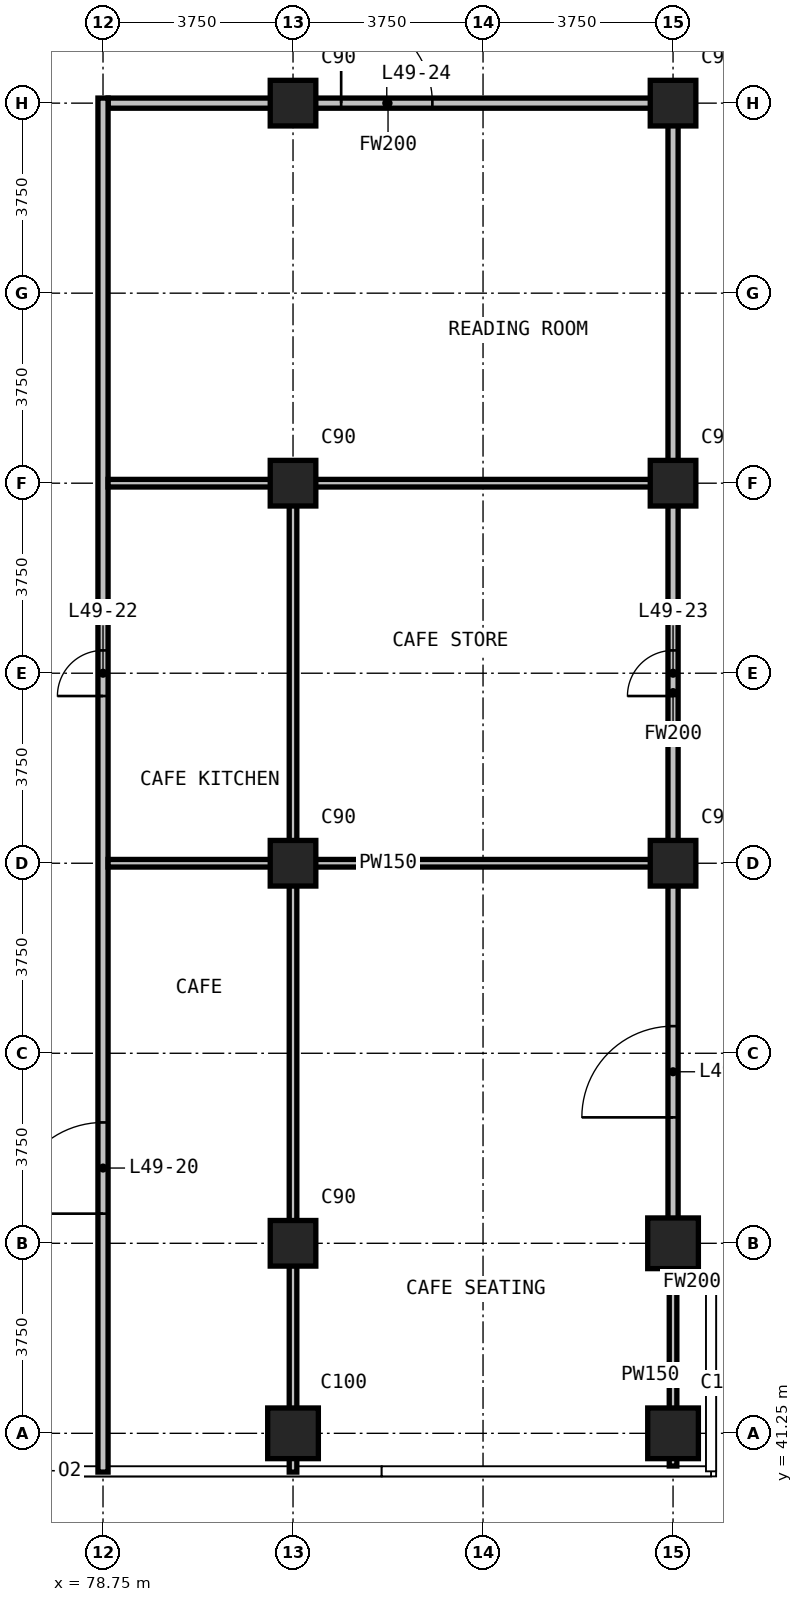
"""IFC4 building model, lengths in metres.
Left out: names, types, materials, properties, quantities, classifications, styles, units other than length and angle.
Written with IfcOpenShell. Run it as: python <this file> out.ifc"""

import sys

from ifc_helpers import new_model, si_unit, direction, frame, frame_2d, origin, origin_2d, place, context, subcontext, project, spatial, rectangle, extrude, element, fill, save


model = new_model("IFC4")
c1 = context("Model", 3, precision=1e-05, world=origin(), true_north=direction((0.0, 1.0)))
c2 = subcontext(c1, "Body", "Model", "MODEL_VIEW")
j1 = project(units=[si_unit("LENGTHUNIT", "METRE"), si_unit("PLANEANGLEUNIT", "RADIAN")], contexts=[c1])
p1 = place(None, origin())
s1 = spatial("IfcSite", under=j1, at=p1, CompositionType="ELEMENT")
p2 = place(p1, origin())
s2 = spatial("IfcBuilding", under=s1, at=p2, CompositionType="ELEMENT")
p3 = place(p2, frame((0.0, 0.0, 192.3)))
s3 = spatial("IfcBuildingStorey", under=s2, at=p3, CompositionType="ELEMENT", Elevation=192.3)
p4 = place(p3, frame((82.5, 41.25, 0.0), z_axis=(0.0, 0.0, 1.0), x_axis=(1.0, 0.0, 0.0)))
e1 = element("IfcColumn", 1, at=p4, inside=s3, PredefinedType="COLUMN", context=c2, shape_type="SweptSolid", body=[
    extrude(rectangle(XDim=1.0, YDim=1.0, at=origin_2d()), origin(), (0.0, 0.0, 1.0), 3.6),
])
for number, where, z_axis, x_axis in (
    (2, (82.5, 45.0, 0.0), (0.0, 0.0, 1.0), (1.0, 0.0, 0.0)),
    (3, (82.5, 52.5, 0.0), (0.0, 0.0, 1.0), (1.0, 0.0, 0.0)),
    (4, (82.5, 60.0, 0.0), (0.0, 0.0, 1.0), (1.0, 0.0, 0.0)),
    (5, (82.5, 67.5, 0.0), (0.0, 0.0, 1.0), (1.0, 0.0, 0.0)),
):
    element("IfcColumn", number, at=place(p3, frame(where, z_axis=z_axis, x_axis=x_axis)), inside=s3, PredefinedType="COLUMN", context=c2, shape_type="SweptSolid", body=[
        extrude(rectangle(XDim=0.9, YDim=0.9, at=origin_2d()), origin(), (0.0, 0.0, 1.0), 3.6),
    ])
for number, where, z_axis, x_axis in (
    (6, (90.0, 41.25, 0.0), (0.0, 0.0, 1.0), (1.0, 0.0, 0.0)),
    (7, (90.0, 45.0, 0.0), (0.0, 0.0, 1.0), (1.0, 0.0, 0.0)),
):
    element("IfcColumn", number, at=place(p3, frame(where, z_axis=z_axis, x_axis=x_axis)), inside=s3, PredefinedType="COLUMN", context=c2, shape_type="SweptSolid", body=[
        extrude(rectangle(XDim=1.0, YDim=1.0, at=origin_2d()), origin(), (0.0, 0.0, 1.0), 3.6),
    ])
for number, where, z_axis, x_axis in (
    (8, (90.0, 52.5, 0.0), (0.0, 0.0, 1.0), (1.0, 0.0, 0.0)),
    (9, (90.0, 60.0, 0.0), (0.0, 0.0, 1.0), (1.0, 0.0, 0.0)),
    (10, (90.0, 67.5, 0.0), (0.0, 0.0, 1.0), (1.0, 0.0, 0.0)),
):
    element("IfcColumn", number, at=place(p3, frame(where, z_axis=z_axis, x_axis=x_axis)), inside=s3, PredefinedType="COLUMN", context=c2, shape_type="SweptSolid", body=[
        extrude(rectangle(XDim=0.9, YDim=0.9, at=origin_2d()), origin(), (0.0, 0.0, 1.0), 3.6),
    ])
p5 = place(p3, frame((90.1, 44.235, 0.0), z_axis=(0.0, 0.0, 1.0), x_axis=(1.0, 0.0, 0.0)))
e11 = element("IfcWall", 11, at=p5, inside=s3, PredefinedType="PARTITIONING", context=c2, shape_type="SweptSolid", body=[
    extrude(rectangle(XDim=0.545, YDim=0.2, at=frame_2d((0.272, 0.0))), origin(), (0.0, 0.0, 1.0), 3.3),
])
p6 = place(p3, frame((78.85, 67.5, 0.0), z_axis=(0.0, 0.0, 1.0), x_axis=(1.0, 0.0, 0.0)))
e12 = element("IfcWall", 12, at=p6, inside=s3, PredefinedType="PARTITIONING", context=c2, shape_type="SweptSolid", body=[
    extrude(rectangle(XDim=11.05, YDim=0.2, at=frame_2d((5.525, 0.0))), origin(), (0.0, 0.0, 1.0), 3.3),
])
p7 = place(p6, frame((4.6, 0.0, 0.0)))
e13 = element("IfcOpeningElement", 13, at=p7, cuts=e12, PredefinedType="OPENING", context=c2, shape_type="SweptSolid", body=[
    extrude(rectangle(XDim=1.8, YDim=2.2, at=frame_2d((0.9, 1.1))), frame((0.0, 0.11, 0.0), z_axis=(0.0, -1.0, 0.0), x_axis=(1.0, 0.0, 0.0)), (0.0, 0.0, 1.0), 0.22),
])
p8 = place(p3, frame((78.75, 40.485, 0.0), z_axis=(0.0, 0.0, 1.0), x_axis=(0.0, 1.0, 0.0)))
e14 = element("IfcWall", 14, at=p8, inside=s3, PredefinedType="PARTITIONING", context=c2, shape_type="SweptSolid", body=[
    extrude(rectangle(XDim=27.115, YDim=0.2, at=frame_2d((13.558, 0.0))), origin(), (0.0, 0.0, 1.0), 3.3),
])
p9 = place(p8, frame((5.1, 0.0, 0.0)))
e15 = element("IfcOpeningElement", 15, at=p9, cuts=e14, PredefinedType="OPENING", context=c2, shape_type="SweptSolid", body=[
    extrude(rectangle(XDim=1.8, YDim=2.2, at=frame_2d((0.9, 1.1))), frame((0.0, 0.11, 0.0), z_axis=(0.0, -1.0, 0.0), x_axis=(1.0, 0.0, 0.0)), (0.0, 0.0, 1.0), 0.22),
])
p10 = place(p8, frame((15.315, 0.0, 0.0)))
e16 = element("IfcOpeningElement", 16, at=p10, cuts=e14, PredefinedType="OPENING", context=c2, shape_type="SweptSolid", body=[
    extrude(rectangle(XDim=0.9, YDim=2.2, at=frame_2d((0.45, 1.1))), frame((0.0, 0.11, 0.0), z_axis=(0.0, -1.0, 0.0), x_axis=(1.0, 0.0, 0.0)), (0.0, 0.0, 1.0), 0.22),
])
p11 = place(p3, frame((90.0, 44.135, 0.0), z_axis=(0.0, 0.0, 1.0), x_axis=(0.0, 1.0, 0.0)))
e17 = element("IfcWall", 17, at=p11, inside=s3, PredefinedType="PARTITIONING", context=c2, shape_type="SweptSolid", body=[
    extrude(rectangle(XDim=23.465, YDim=0.2, at=frame_2d((11.732, 0.0))), origin(), (0.0, 0.0, 1.0), 3.3),
])
p12 = place(p11, frame((3.35, 0.0, 0.0)))
e18 = element("IfcOpeningElement", 18, at=p12, cuts=e17, PredefinedType="OPENING", context=c2, shape_type="SweptSolid", body=[
    extrude(rectangle(XDim=1.8, YDim=2.2, at=frame_2d((0.9, 1.1))), frame((0.0, 0.11, 0.0), z_axis=(0.0, -1.0, 0.0), x_axis=(1.0, 0.0, 0.0)), (0.0, 0.0, 1.0), 0.22),
])
p13 = place(p11, frame((11.665, 0.0, 0.0)))
e19 = element("IfcOpeningElement", 19, at=p13, cuts=e17, PredefinedType="OPENING", context=c2, shape_type="SweptSolid", body=[
    extrude(rectangle(XDim=0.9, YDim=2.2, at=frame_2d((0.45, 1.1))), frame((0.0, 0.11, 0.0), z_axis=(0.0, -1.0, 0.0), x_axis=(1.0, 0.0, 0.0)), (0.0, 0.0, 1.0), 0.22),
])
for number, where, z_axis, x_axis in (
    (20, (78.85, 52.5, 0.0), (0.0, 0.0, 1.0), (1.0, 0.0, 0.0)),
    (21, (78.85, 60.0, 0.0), (0.0, 0.0, 1.0), (1.0, 0.0, 0.0)),
):
    element("IfcWall", number, at=place(p3, frame(where, z_axis=z_axis, x_axis=x_axis)), inside=s3, PredefinedType="PARTITIONING", context=c2, shape_type="SweptSolid", body=[
        extrude(rectangle(XDim=11.05, YDim=0.15, at=frame_2d((5.525, 0.0))), origin(), (0.0, 0.0, 1.0), 3.3),
    ])
p14 = place(p3, frame((82.5, 40.485, 0.0), z_axis=(0.0, 0.0, 1.0), x_axis=(0.0, 1.0, 0.0)))
e22 = element("IfcWall", 22, at=p14, inside=s3, PredefinedType="PARTITIONING", context=c2, shape_type="SweptSolid", body=[
    extrude(rectangle(XDim=19.44, YDim=0.15, at=frame_2d((9.72, 0.0))), origin(), (0.0, 0.0, 1.0), 3.3),
])
p15 = place(p3, frame((90.0, 40.605, 0.0), z_axis=(0.0, 0.0, 1.0), x_axis=(0.0, 1.0, 0.0)))
e23 = element("IfcWall", 23, at=p15, inside=s3, PredefinedType="PARTITIONING", context=c2, shape_type="SweptSolid", body=[
    extrude(rectangle(XDim=3.6, YDim=0.15, at=frame_2d((1.8, 0.0))), origin(), (0.0, 0.0, 1.0), 3.3),
])
p16 = place(p9, origin())
e24 = element("IfcDoor", 24, at=p16, inside=s3, OperationType="DOUBLE_DOOR_SINGLE_SWING", PredefinedType="DOOR", context=c2, shape_type="SweptSolid", body=[
    extrude(rectangle(XDim=1.8, YDim=2.2, at=frame_2d((0.9, 1.1))), frame((0.0, 0.025, 0.0), z_axis=(0.0, -1.0, 0.0), x_axis=(1.0, 0.0, 0.0)), (0.0, 0.0, 1.0), 0.05),
])
fill(e15, e24)
p17 = place(p12, origin())
e25 = element("IfcDoor", 25, at=p17, inside=s3, OperationType="DOUBLE_DOOR_SINGLE_SWING", PredefinedType="DOOR", context=c2, shape_type="SweptSolid", body=[
    extrude(rectangle(XDim=1.8, YDim=2.2, at=frame_2d((0.9, 1.1))), frame((0.0, 0.025, 0.0), z_axis=(0.0, -1.0, 0.0), x_axis=(1.0, 0.0, 0.0)), (0.0, 0.0, 1.0), 0.05),
])
fill(e18, e25)
p18 = place(p10, origin())
e26 = element("IfcDoor", 26, at=p18, inside=s3, OperationType="SINGLE_SWING_LEFT", PredefinedType="DOOR", context=c2, shape_type="SweptSolid", body=[
    extrude(rectangle(XDim=0.9, YDim=2.2, at=frame_2d((0.45, 1.1))), frame((0.0, 0.025, 0.0), z_axis=(0.0, -1.0, 0.0), x_axis=(1.0, 0.0, 0.0)), (0.0, 0.0, 1.0), 0.05),
])
fill(e16, e26)
p19 = place(p13, origin())
e27 = element("IfcDoor", 27, at=p19, inside=s3, OperationType="SINGLE_SWING_LEFT", PredefinedType="DOOR", context=c2, shape_type="SweptSolid", body=[
    extrude(rectangle(XDim=0.9, YDim=2.2, at=frame_2d((0.45, 1.1))), frame((0.0, 0.025, 0.0), z_axis=(0.0, -1.0, 0.0), x_axis=(1.0, 0.0, 0.0)), (0.0, 0.0, 1.0), 0.05),
])
fill(e19, e27)
p20 = place(p7, origin())
e28 = element("IfcDoor", 28, at=p20, inside=s3, OperationType="DOUBLE_DOOR_SINGLE_SWING", PredefinedType="DOOR", context=c2, shape_type="SweptSolid", body=[
    extrude(rectangle(XDim=1.8, YDim=2.2, at=frame_2d((0.9, 1.1))), frame((0.0, 0.025, 0.0), z_axis=(0.0, -1.0, 0.0), x_axis=(1.0, 0.0, 0.0)), (0.0, 0.0, 1.0), 0.05),
])
fill(e13, e28)
save(model, sys.argv[1])
